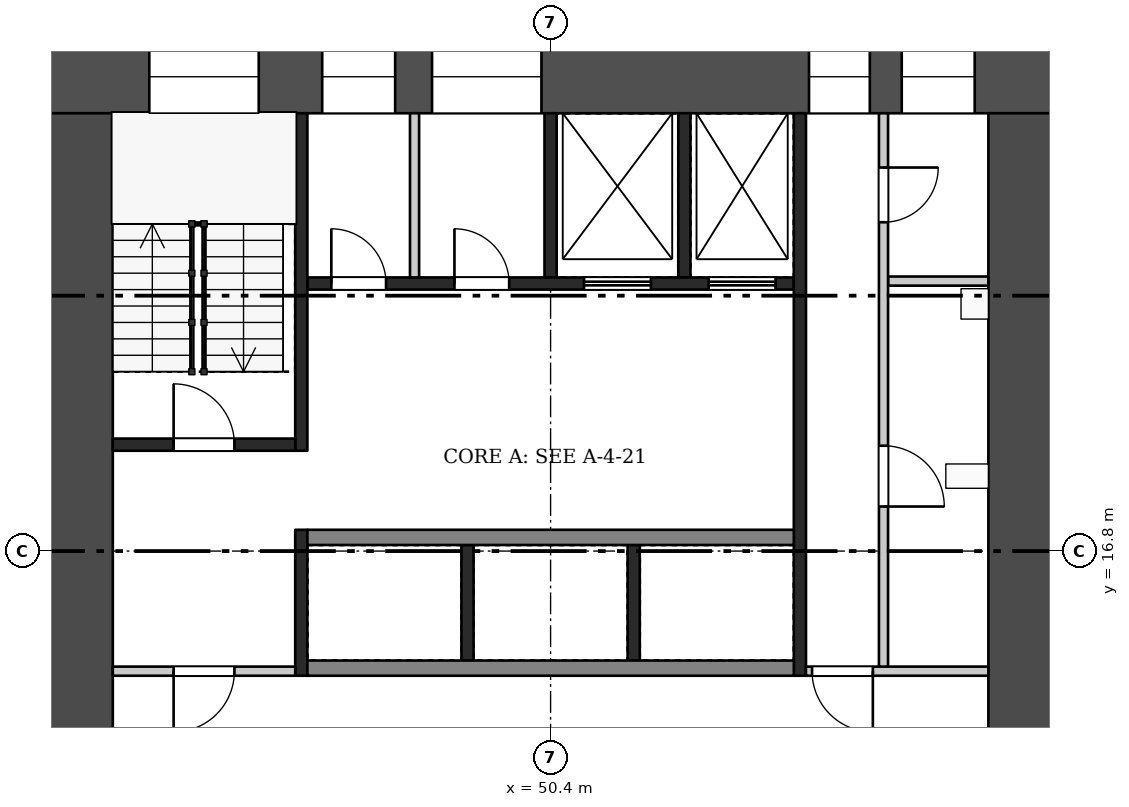
"""IFC4 building model, lengths in metres.
Left out: names, types, materials, properties, quantities, classifications, styles, units other than length and angle.
Written with IfcOpenShell. Run it as: python <this file> out.ifc"""

import sys

from ifc_helpers import new_model, si_unit, direction, frame, frame_2d, origin, place, context, subcontext, project, spatial, rectangle, extrude, element, fill, save


model = new_model("IFC4")
c1 = context("Model", 3, precision=1e-05, world=origin(), true_north=direction((0.0, 1.0)))
c2 = subcontext(c1, "Body", "Model", "MODEL_VIEW")
j1 = project(units=[si_unit("LENGTHUNIT", "METRE"), si_unit("PLANEANGLEUNIT", "RADIAN")], contexts=[c1])
p1 = place(None, origin())
s1 = spatial("IfcSite", under=j1, at=p1, CompositionType="ELEMENT")
p2 = place(p1, origin())
s2 = spatial("IfcBuilding", under=s1, at=p2, CompositionType="ELEMENT")
p3 = place(p2, frame((0.0, 0.0, 133.7)))
s3 = spatial("IfcBuildingStorey", under=s2, at=p3, CompositionType="ELEMENT", Elevation=133.7)
p4 = place(p3, frame((42.0, 24.6, 0.0), z_axis=(0.0, 0.0, 1.0), x_axis=(1.0, 0.0, 0.0)))
e1 = element("IfcWall", 1, at=p4, inside=s3, PredefinedType="SHEAR", context=c2, shape_type="SweptSolid", body=[
    extrude(rectangle(XDim=16.8, YDim=1.2, at=frame_2d((8.4, 0.0))), origin(), (0.0, 0.0, 1.0), 3.22),
])
p5 = place(p4, frame((1.8, 0.0, 0.5)))
e2 = element("IfcOpeningElement", 2, at=p5, cuts=e1, PredefinedType="OPENING", context=c2, shape_type="SweptSolid", body=[
    extrude(rectangle(XDim=1.8, YDim=2.4, at=frame_2d((0.9, 1.2))), frame((0.0, 0.61, 0.0), z_axis=(0.0, -1.0, 0.0), x_axis=(1.0, 0.0, 0.0)), (0.0, 0.0, 1.0), 1.22),
])
p6 = place(p4, frame((4.644, 0.0, 1.6)))
e3 = element("IfcOpeningElement", 3, at=p6, cuts=e1, PredefinedType="OPENING", context=c2, shape_type="SweptSolid", body=[
    extrude(rectangle(XDim=1.2, YDim=1.2, at=frame_2d((0.6, 0.6))), frame((0.0, 0.61, 0.0), z_axis=(0.0, -1.0, 0.0), x_axis=(1.0, 0.0, 0.0)), (0.0, 0.0, 1.0), 1.22),
])
p7 = place(p4, frame((6.45, 0.0, 1.6)))
e4 = element("IfcOpeningElement", 4, at=p7, cuts=e1, PredefinedType="OPENING", context=c2, shape_type="SweptSolid", body=[
    extrude(rectangle(XDim=1.8, YDim=1.2, at=frame_2d((0.9, 0.6))), frame((0.0, 0.61, 0.0), z_axis=(0.0, -1.0, 0.0), x_axis=(1.0, 0.0, 0.0)), (0.0, 0.0, 1.0), 1.22),
])
p8 = place(p4, frame((12.65, 0.0, 0.6)))
e5 = element("IfcOpeningElement", 5, at=p8, cuts=e1, PredefinedType="OPENING", context=c2, shape_type="SweptSolid", body=[
    extrude(rectangle(XDim=1.0, YDim=2.1, at=frame_2d((0.5, 1.05))), frame((0.0, 0.61, 0.0), z_axis=(0.0, -1.0, 0.0), x_axis=(1.0, 0.0, 0.0)), (0.0, 0.0, 1.0), 1.22),
])
p9 = place(p4, frame((14.175, 0.0, 1.6)))
e6 = element("IfcOpeningElement", 6, at=p9, cuts=e1, PredefinedType="OPENING", context=c2, shape_type="SweptSolid", body=[
    extrude(rectangle(XDim=1.2, YDim=1.2, at=frame_2d((0.6, 0.6))), frame((0.0, 0.61, 0.0), z_axis=(0.0, -1.0, 0.0), x_axis=(1.0, 0.0, 0.0)), (0.0, 0.0, 1.0), 1.22),
])
p10 = place(p3, frame((42.6, 9.6, 0.0), z_axis=(0.0, 0.0, 1.0), x_axis=(0.0, 1.0, 0.0)))
e7 = element("IfcWall", 7, at=p10, inside=s3, PredefinedType="SHEAR", context=c2, shape_type="SweptSolid", body=[
    extrude(rectangle(XDim=14.4, YDim=1.2, at=frame_2d((7.2, 0.0))), origin(), (0.0, 0.0, 1.0), 3.22),
])
p11 = place(p10, frame((2.1, 0.0, 0.0)))
e8 = element("IfcOpeningElement", 8, at=p11, cuts=e7, PredefinedType="OPENING", context=c2, shape_type="SweptSolid", body=[
    extrude(rectangle(XDim=1.8, YDim=2.1, at=frame_2d((0.9, 1.05))), frame((0.0, 0.61, 0.0), z_axis=(0.0, -1.0, 0.0), x_axis=(1.0, 0.0, 0.0)), (0.0, 0.0, 1.0), 1.22),
])
p12 = place(p3, frame((58.2, 9.6, 0.0), z_axis=(0.0, 0.0, 1.0), x_axis=(0.0, 1.0, 0.0)))
e9 = element("IfcWall", 9, at=p12, inside=s3, PredefinedType="SHEAR", context=c2, shape_type="SweptSolid", body=[
    extrude(rectangle(XDim=14.4, YDim=1.2, at=frame_2d((7.2, 0.0))), origin(), (0.0, 0.0, 1.0), 3.22),
])
p13 = place(p12, frame((2.1, 0.0, 0.0)))
e10 = element("IfcOpeningElement", 10, at=p13, cuts=e9, PredefinedType="OPENING", context=c2, shape_type="SweptSolid", body=[
    extrude(rectangle(XDim=1.8, YDim=2.1, at=frame_2d((0.9, 1.05))), frame((0.0, 0.61, 0.0), z_axis=(0.0, -1.0, 0.0), x_axis=(1.0, 0.0, 0.0)), (0.0, 0.0, 1.0), 1.22),
])
for number, where, z_axis, x_axis in (
    (11, (49.033, 15.0, 0.0), (0.0, 0.0, 1.0), (0.0, 1.0, 0.0)),
    (12, (51.767, 15.0, 0.0), (0.0, 0.0, 1.0), (0.0, 1.0, 0.0)),
):
    element("IfcWall", number, at=place(p3, frame(where, z_axis=z_axis, x_axis=x_axis)), inside=s3, PredefinedType="SHEAR", context=c2, shape_type="SweptSolid", body=[
        extrude(rectangle(XDim=1.9, YDim=0.2, at=frame_2d((0.95, 0.0))), origin(), (0.0, 0.0, 1.0), 3.22),
    ])
for number, where, z_axis, x_axis in (
    (13, (46.4, 14.875, 0.0), (0.0, 0.0, 1.0), (1.0, 0.0, 0.0)),
    (14, (46.4, 17.025, 0.0), (0.0, 0.0, 1.0), (1.0, 0.0, 0.0)),
):
    element("IfcWall", number, at=place(p3, frame(where, z_axis=z_axis, x_axis=x_axis)), inside=s3, PredefinedType="SHEAR", context=c2, shape_type="SweptSolid", body=[
        extrude(rectangle(XDim=8.0, YDim=0.25, at=frame_2d((4.0, 0.0))), origin(), (0.0, 0.0, 1.0), 3.22),
    ])
for number, where, z_axis, x_axis in (
    (15, (50.4, 21.3, 0.0), (0.0, 0.0, 1.0), (0.0, 1.0, 0.0)),
    (16, (52.6, 21.3, 0.0), (0.0, 0.0, 1.0), (0.0, 1.0, 0.0)),
):
    element("IfcWall", number, at=place(p3, frame(where, z_axis=z_axis, x_axis=x_axis)), inside=s3, PredefinedType="SHEAR", context=c2, shape_type="SweptSolid", body=[
        extrude(rectangle(XDim=2.7, YDim=0.2, at=frame_2d((1.35, 0.0))), origin(), (0.0, 0.0, 1.0), 3.22),
    ])
p14 = place(p3, frame((48.163, 21.3, 0.0), z_axis=(0.0, 0.0, 1.0), x_axis=(0.0, 1.0, 0.0)))
e17 = element("IfcWall", 17, at=p14, inside=s3, PredefinedType="PARTITIONING", context=c2, shape_type="SweptSolid", body=[
    extrude(rectangle(XDim=2.7, YDim=0.15, at=frame_2d((1.35, 0.0))), origin(), (0.0, 0.0, 1.0), 3.22),
])
p15 = place(p3, frame((46.4, 21.2, 0.0), z_axis=(0.0, 0.0, 1.0), x_axis=(1.0, 0.0, 0.0)))
e18 = element("IfcWall", 18, at=p15, inside=s3, PredefinedType="SHEAR", context=c2, shape_type="SweptSolid", body=[
    extrude(rectangle(XDim=8.0, YDim=0.2, at=frame_2d((4.0, 0.0))), origin(), (0.0, 0.0, 1.0), 3.22),
])
p16 = place(p15, frame((0.394, 0.0, 0.0)))
e19 = element("IfcOpeningElement", 19, at=p16, cuts=e18, PredefinedType="OPENING", context=c2, shape_type="SweptSolid", body=[
    extrude(rectangle(XDim=0.9, YDim=2.1, at=frame_2d((0.45, 1.05))), frame((0.0, 0.11, 0.0), z_axis=(0.0, -1.0, 0.0), x_axis=(1.0, 0.0, 0.0)), (0.0, 0.0, 1.0), 0.22),
])
p17 = place(p15, frame((2.419, 0.0, 0.0)))
e20 = element("IfcOpeningElement", 20, at=p17, cuts=e18, PredefinedType="OPENING", context=c2, shape_type="SweptSolid", body=[
    extrude(rectangle(XDim=0.9, YDim=2.1, at=frame_2d((0.45, 1.05))), frame((0.0, 0.11, 0.0), z_axis=(0.0, -1.0, 0.0), x_axis=(1.0, 0.0, 0.0)), (0.0, 0.0, 1.0), 0.22),
])
p18 = place(p15, frame((4.55, 0.0, 0.0)))
e21 = element("IfcOpeningElement", 21, at=p18, cuts=e18, PredefinedType="OPENING", context=c2, shape_type="SweptSolid", body=[
    extrude(rectangle(XDim=1.1, YDim=2.1, at=frame_2d((0.55, 1.05))), frame((0.0, 0.11, 0.0), z_axis=(0.0, -1.0, 0.0), x_axis=(1.0, 0.0, 0.0)), (0.0, 0.0, 1.0), 0.22),
])
p19 = place(p15, frame((6.6, 0.0, 0.0)))
e22 = element("IfcOpeningElement", 22, at=p19, cuts=e18, PredefinedType="OPENING", context=c2, shape_type="SweptSolid", body=[
    extrude(rectangle(XDim=1.1, YDim=2.1, at=frame_2d((0.55, 1.05))), frame((0.0, 0.11, 0.0), z_axis=(0.0, -1.0, 0.0), x_axis=(1.0, 0.0, 0.0)), (0.0, 0.0, 1.0), 0.22),
])
p20 = place(p3, frame((46.3, 14.75, 0.0), z_axis=(0.0, 0.0, 1.0), x_axis=(0.0, 1.0, 0.0)))
e23 = element("IfcWall", 23, at=p20, inside=s3, PredefinedType="SHEAR", context=c2, shape_type="SweptSolid", body=[
    extrude(rectangle(XDim=2.4, YDim=0.2, at=frame_2d((1.2, 0.0))), origin(), (0.0, 0.0, 1.0), 3.22),
])
p21 = place(p3, frame((46.3, 18.45, 0.0), z_axis=(0.0, 0.0, 1.0), x_axis=(0.0, 1.0, 0.0)))
e24 = element("IfcWall", 24, at=p21, inside=s3, PredefinedType="SHEAR", context=c2, shape_type="SweptSolid", body=[
    extrude(rectangle(XDim=5.55, YDim=0.2, at=frame_2d((2.775, 0.0))), origin(), (0.0, 0.0, 1.0), 3.22),
])
p22 = place(p3, frame((43.2, 14.825, 0.0), z_axis=(0.0, 0.0, 1.0), x_axis=(1.0, 0.0, 0.0)))
e25 = element("IfcWall", 25, at=p22, inside=s3, PredefinedType="PARTITIONING", context=c2, shape_type="SweptSolid", body=[
    extrude(rectangle(XDim=3.0, YDim=0.15, at=frame_2d((1.5, 0.0))), origin(), (0.0, 0.0, 1.0), 3.22),
])
p23 = place(p22, frame((1.0, 0.0, 0.0)))
e26 = element("IfcOpeningElement", 26, at=p23, cuts=e25, PredefinedType="OPENING", context=c2, shape_type="SweptSolid", body=[
    extrude(rectangle(XDim=1.0, YDim=2.1, at=frame_2d((0.5, 1.05))), frame((0.0, 0.085, 0.0), z_axis=(0.0, -1.0, 0.0), x_axis=(1.0, 0.0, 0.0)), (0.0, 0.0, 1.0), 0.17),
])
p24 = place(p3, frame((43.2, 18.55, 0.0), z_axis=(0.0, 0.0, 1.0), x_axis=(1.0, 0.0, 0.0)))
e27 = element("IfcWall", 27, at=p24, inside=s3, PredefinedType="SHEAR", context=c2, shape_type="SweptSolid", body=[
    extrude(rectangle(XDim=3.0, YDim=0.2, at=frame_2d((1.5, 0.0))), origin(), (0.0, 0.0, 1.0), 3.22),
])
p25 = place(p24, frame((1.0, 0.0, 0.0)))
e28 = element("IfcOpeningElement", 28, at=p25, cuts=e27, PredefinedType="OPENING", context=c2, shape_type="SweptSolid", body=[
    extrude(rectangle(XDim=1.0, YDim=2.1, at=frame_2d((0.5, 1.05))), frame((0.0, 0.11, 0.0), z_axis=(0.0, -1.0, 0.0), x_axis=(1.0, 0.0, 0.0)), (0.0, 0.0, 1.0), 0.22),
])
p26 = place(p3, frame((54.5, 14.75, 0.0), z_axis=(0.0, 0.0, 1.0), x_axis=(0.0, 1.0, 0.0)))
e29 = element("IfcWall", 29, at=p26, inside=s3, PredefinedType="SHEAR", context=c2, shape_type="SweptSolid", body=[
    extrude(rectangle(XDim=9.25, YDim=0.2, at=frame_2d((4.625, 0.0))), origin(), (0.0, 0.0, 1.0), 3.22),
])
p27 = place(p3, frame((54.6, 14.825, 0.0), z_axis=(0.0, 0.0, 1.0), x_axis=(1.0, 0.0, 0.0)))
e30 = element("IfcWall", 30, at=p27, inside=s3, PredefinedType="PARTITIONING", context=c2, shape_type="SweptSolid", body=[
    extrude(rectangle(XDim=3.0, YDim=0.15, at=frame_2d((1.5, 0.0))), origin(), (0.0, 0.0, 1.0), 3.22),
])
p28 = place(p27, frame((0.1, 0.0, 0.0)))
e31 = element("IfcOpeningElement", 31, at=p28, cuts=e30, PredefinedType="OPENING", context=c2, shape_type="SweptSolid", body=[
    extrude(rectangle(XDim=1.0, YDim=2.1, at=frame_2d((0.5, 1.05))), frame((0.0, 0.085, 0.0), z_axis=(0.0, -1.0, 0.0), x_axis=(1.0, 0.0, 0.0)), (0.0, 0.0, 1.0), 0.17),
])
p29 = place(p3, frame((55.95, 21.24, 0.0), z_axis=(0.0, 0.0, 1.0), x_axis=(1.0, 0.0, 0.0)))
e32 = element("IfcWall", 32, at=p29, inside=s3, PredefinedType="PARTITIONING", context=c2, shape_type="SweptSolid", body=[
    extrude(rectangle(XDim=1.65, YDim=0.15, at=frame_2d((0.825, 0.0))), origin(), (0.0, 0.0, 1.0), 3.22),
])
p30 = place(p3, frame((55.875, 14.9, 0.0), z_axis=(0.0, 0.0, 1.0), x_axis=(0.0, 1.0, 0.0)))
e33 = element("IfcWall", 33, at=p30, inside=s3, PredefinedType="PARTITIONING", context=c2, shape_type="SweptSolid", body=[
    extrude(rectangle(XDim=9.1, YDim=0.15, at=frame_2d((4.55, 0.0))), origin(), (0.0, 0.0, 1.0), 3.22),
])
p31 = place(p30, frame((2.633, 0.0, 0.0)))
e34 = element("IfcOpeningElement", 34, at=p31, cuts=e33, PredefinedType="OPENING", context=c2, shape_type="SweptSolid", body=[
    extrude(rectangle(XDim=1.0, YDim=2.1, at=frame_2d((0.5, 1.05))), frame((0.0, 0.085, 0.0), z_axis=(0.0, -1.0, 0.0), x_axis=(1.0, 0.0, 0.0)), (0.0, 0.0, 1.0), 0.17),
])
p32 = place(p30, frame((7.308, 0.0, 0.0)))
e35 = element("IfcOpeningElement", 35, at=p32, cuts=e33, PredefinedType="OPENING", context=c2, shape_type="SweptSolid", body=[
    extrude(rectangle(XDim=0.9, YDim=2.1, at=frame_2d((0.45, 1.05))), frame((0.0, 0.085, 0.0), z_axis=(0.0, -1.0, 0.0), x_axis=(1.0, 0.0, 0.0)), (0.0, 0.0, 1.0), 0.17),
])
p33 = place(p16, origin())
e36 = element("IfcDoor", 36, at=p33, inside=s3, OperationType="SINGLE_SWING_LEFT", PredefinedType="DOOR", context=c2, shape_type="SweptSolid", body=[
    extrude(rectangle(XDim=0.9, YDim=2.1, at=frame_2d((0.45, 1.05))), frame((0.0, 0.025, 0.0), z_axis=(0.0, -1.0, 0.0), x_axis=(1.0, 0.0, 0.0)), (0.0, 0.0, 1.0), 0.05),
])
fill(e19, e36)
p34 = place(p17, origin())
e37 = element("IfcDoor", 37, at=p34, inside=s3, OperationType="SINGLE_SWING_LEFT", PredefinedType="DOOR", context=c2, shape_type="SweptSolid", body=[
    extrude(rectangle(XDim=0.9, YDim=2.1, at=frame_2d((0.45, 1.05))), frame((0.0, 0.025, 0.0), z_axis=(0.0, -1.0, 0.0), x_axis=(1.0, 0.0, 0.0)), (0.0, 0.0, 1.0), 0.05),
])
fill(e20, e37)
p35 = place(p18, origin())
e38 = element("IfcDoor", 38, at=p35, inside=s3, OperationType="DOUBLE_DOOR_SLIDING", PredefinedType="DOOR", context=c2, shape_type="SweptSolid", body=[
    extrude(rectangle(XDim=1.1, YDim=2.1, at=frame_2d((0.55, 1.05))), frame((0.0, 0.025, 0.0), z_axis=(0.0, -1.0, 0.0), x_axis=(1.0, 0.0, 0.0)), (0.0, 0.0, 1.0), 0.05),
])
fill(e21, e38)
p36 = place(p19, origin())
e39 = element("IfcDoor", 39, at=p36, inside=s3, OperationType="DOUBLE_DOOR_SLIDING", PredefinedType="DOOR", context=c2, shape_type="SweptSolid", body=[
    extrude(rectangle(XDim=1.1, YDim=2.1, at=frame_2d((0.55, 1.05))), frame((0.0, 0.025, 0.0), z_axis=(0.0, -1.0, 0.0), x_axis=(1.0, 0.0, 0.0)), (0.0, 0.0, 1.0), 0.05),
])
fill(e22, e39)
p37 = place(p23, frame((1.0, 0.0, 0.0), z_axis=(0.0, 0.0, 1.0), x_axis=(-1.0, 0.0, 0.0)))
e40 = element("IfcDoor", 40, at=p37, inside=s3, OperationType="SINGLE_SWING_RIGHT", PredefinedType="DOOR", context=c2, shape_type="SweptSolid", body=[
    extrude(rectangle(XDim=1.0, YDim=2.1, at=frame_2d((0.5, 1.05))), frame((0.0, 0.025, 0.0), z_axis=(0.0, -1.0, 0.0), x_axis=(1.0, 0.0, 0.0)), (0.0, 0.0, 1.0), 0.05),
])
fill(e26, e40)
p38 = place(p25, origin())
e41 = element("IfcDoor", 41, at=p38, inside=s3, OperationType="SINGLE_SWING_LEFT", PredefinedType="DOOR", context=c2, shape_type="SweptSolid", body=[
    extrude(rectangle(XDim=1.0, YDim=2.1, at=frame_2d((0.5, 1.05))), frame((0.0, 0.025, 0.0), z_axis=(0.0, -1.0, 0.0), x_axis=(1.0, 0.0, 0.0)), (0.0, 0.0, 1.0), 0.05),
])
fill(e28, e41)
p39 = place(p28, frame((1.0, 0.0, 0.0), z_axis=(0.0, 0.0, 1.0), x_axis=(-1.0, 0.0, 0.0)))
e42 = element("IfcDoor", 42, at=p39, inside=s3, OperationType="SINGLE_SWING_LEFT", PredefinedType="DOOR", context=c2, shape_type="SweptSolid", body=[
    extrude(rectangle(XDim=1.0, YDim=2.1, at=frame_2d((0.5, 1.05))), frame((0.0, 0.025, 0.0), z_axis=(0.0, -1.0, 0.0), x_axis=(1.0, 0.0, 0.0)), (0.0, 0.0, 1.0), 0.05),
])
fill(e31, e42)
p40 = place(p31, frame((1.0, 0.0, 0.0), z_axis=(0.0, 0.0, 1.0), x_axis=(-1.0, 0.0, 0.0)))
e43 = element("IfcDoor", 43, at=p40, inside=s3, OperationType="SINGLE_SWING_RIGHT", PredefinedType="DOOR", context=c2, shape_type="SweptSolid", body=[
    extrude(rectangle(XDim=1.0, YDim=2.1, at=frame_2d((0.5, 1.05))), frame((0.0, 0.025, 0.0), z_axis=(0.0, -1.0, 0.0), x_axis=(1.0, 0.0, 0.0)), (0.0, 0.0, 1.0), 0.05),
])
fill(e34, e43)
p41 = place(p32, frame((0.9, 0.0, 0.0), z_axis=(0.0, 0.0, 1.0), x_axis=(-1.0, 0.0, 0.0)))
e44 = element("IfcDoor", 44, at=p41, inside=s3, OperationType="SINGLE_SWING_LEFT", PredefinedType="DOOR", context=c2, shape_type="SweptSolid", body=[
    extrude(rectangle(XDim=0.9, YDim=2.1, at=frame_2d((0.45, 1.05))), frame((0.0, 0.025, 0.0), z_axis=(0.0, -1.0, 0.0), x_axis=(1.0, 0.0, 0.0)), (0.0, 0.0, 1.0), 0.05),
])
fill(e35, e44)
p42 = place(p5, origin())
e45 = element("IfcWindow", 45, at=p42, inside=s3, PartitioningType="SINGLE_PANEL", PredefinedType="WINDOW", context=c2, shape_type="SweptSolid", body=[
    extrude(rectangle(XDim=1.8, YDim=2.4, at=frame_2d((0.9, 1.2))), frame((0.0, 0.03, 0.0), z_axis=(0.0, -1.0, 0.0), x_axis=(1.0, 0.0, 0.0)), (0.0, 0.0, 1.0), 0.06),
])
fill(e2, e45)
p43 = place(p6, origin())
e46 = element("IfcWindow", 46, at=p43, inside=s3, PartitioningType="SINGLE_PANEL", PredefinedType="WINDOW", context=c2, shape_type="SweptSolid", body=[
    extrude(rectangle(XDim=1.2, YDim=1.2, at=frame_2d((0.6, 0.6))), frame((0.0, 0.03, 0.0), z_axis=(0.0, -1.0, 0.0), x_axis=(1.0, 0.0, 0.0)), (0.0, 0.0, 1.0), 0.06),
])
fill(e3, e46)
p44 = place(p7, origin())
e47 = element("IfcWindow", 47, at=p44, inside=s3, PartitioningType="SINGLE_PANEL", PredefinedType="WINDOW", context=c2, shape_type="SweptSolid", body=[
    extrude(rectangle(XDim=1.8, YDim=1.2, at=frame_2d((0.9, 0.6))), frame((0.0, 0.03, 0.0), z_axis=(0.0, -1.0, 0.0), x_axis=(1.0, 0.0, 0.0)), (0.0, 0.0, 1.0), 0.06),
])
fill(e4, e47)
p45 = place(p8, origin())
e48 = element("IfcWindow", 48, at=p45, inside=s3, PartitioningType="SINGLE_PANEL", PredefinedType="WINDOW", context=c2, shape_type="SweptSolid", body=[
    extrude(rectangle(XDim=1.0, YDim=2.1, at=frame_2d((0.5, 1.05))), frame((0.0, 0.03, 0.0), z_axis=(0.0, -1.0, 0.0), x_axis=(1.0, 0.0, 0.0)), (0.0, 0.0, 1.0), 0.06),
])
fill(e5, e48)
p46 = place(p9, origin())
e49 = element("IfcWindow", 49, at=p46, inside=s3, PartitioningType="SINGLE_PANEL", PredefinedType="WINDOW", context=c2, shape_type="SweptSolid", body=[
    extrude(rectangle(XDim=1.2, YDim=1.2, at=frame_2d((0.6, 0.6))), frame((0.0, 0.03, 0.0), z_axis=(0.0, -1.0, 0.0), x_axis=(1.0, 0.0, 0.0)), (0.0, 0.0, 1.0), 0.06),
])
fill(e6, e49)
save(model, sys.argv[1])
